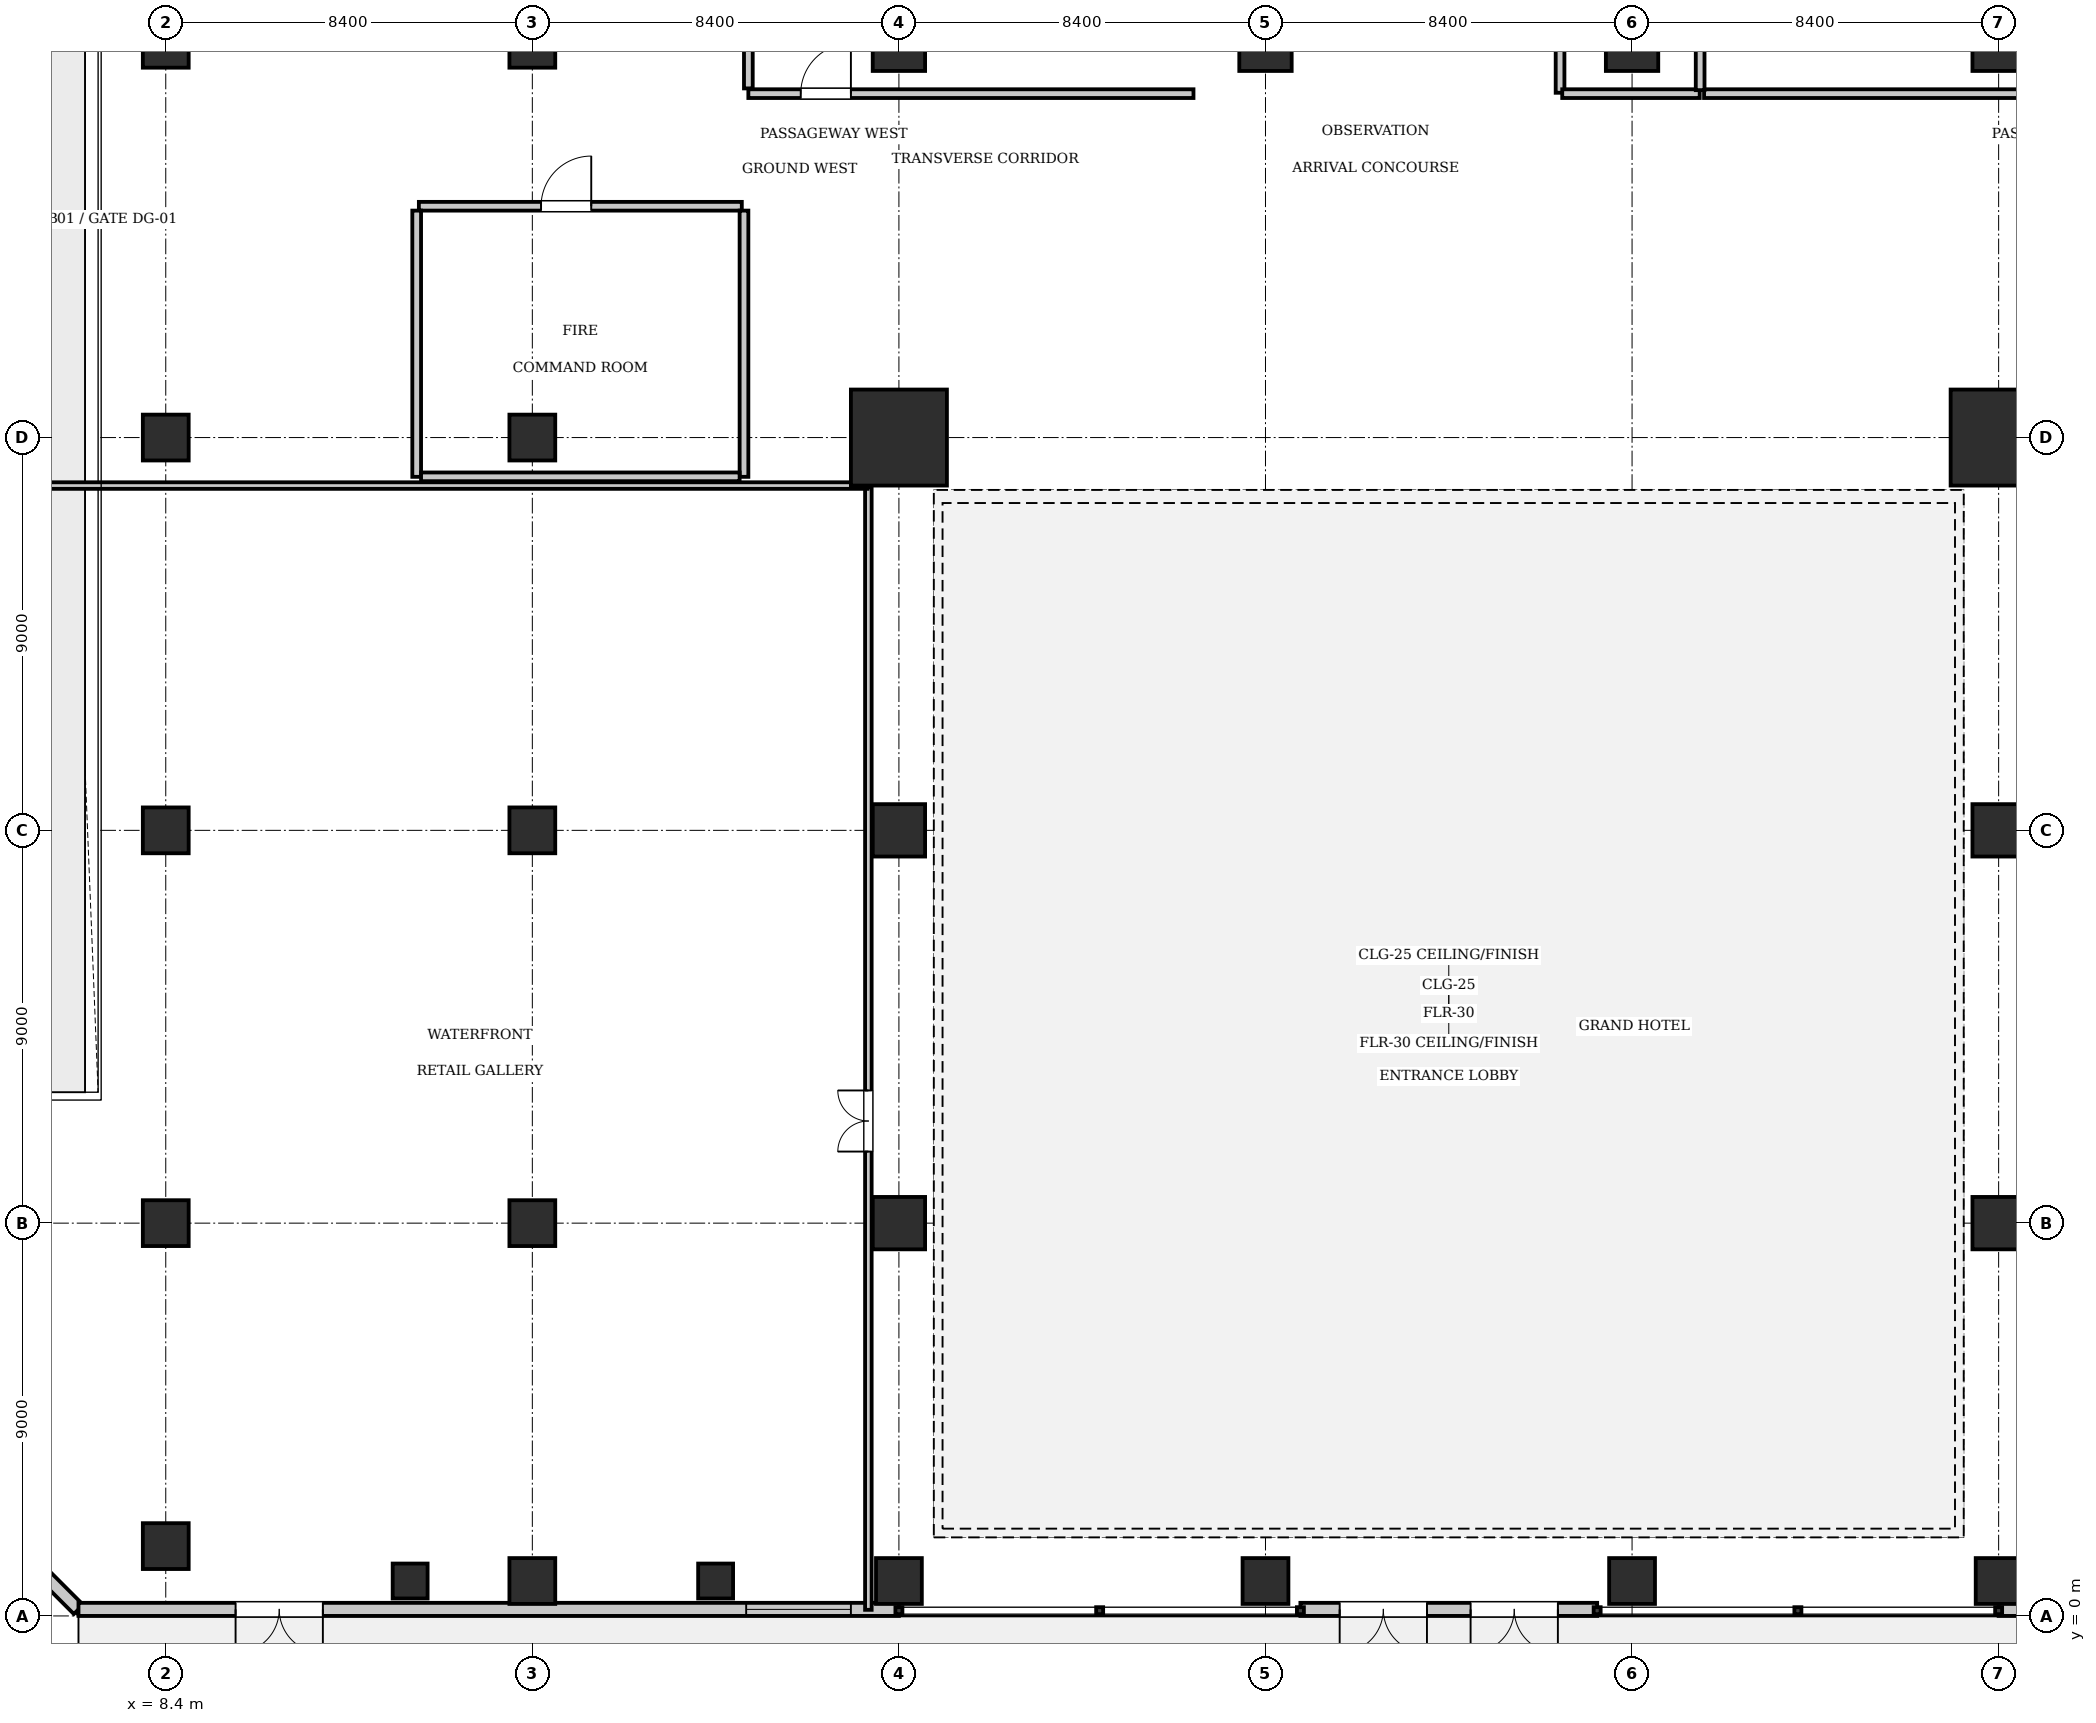
"""IFC4 building model, lengths in metres.
Left out: names, types, materials, properties, quantities, classifications, styles, units other than length and angle.
Written with IfcOpenShell. Run it as: python <this file> out.ifc"""

import sys

from ifc_helpers import new_model, si_unit, direction, frame, frame_2d, origin, origin_2d, place, context, subcontext, project, spatial, rectangle, extrude, element, fill, save


model = new_model("IFC4")
c1 = context("Model", 3, precision=1e-05, world=origin(), true_north=direction((0.0, 1.0)))
c2 = subcontext(c1, "Body", "Model", "MODEL_VIEW")
j1 = project(units=[si_unit("LENGTHUNIT", "METRE"), si_unit("PLANEANGLEUNIT", "RADIAN")], contexts=[c1])
p1 = place(None, origin())
s1 = spatial("IfcSite", under=j1, at=p1, CompositionType="ELEMENT")
p2 = place(p1, origin())
s2 = spatial("IfcBuilding", under=s1, at=p2, CompositionType="ELEMENT")
p3 = place(p2, origin())
s3 = spatial("IfcBuildingStorey", under=s2, at=p3, CompositionType="ELEMENT", Elevation=0.0)
for number, where, z_axis, x_axis in (
    (1, (25.2, 27.0, 0.0), (0.0, 0.0, 1.0), (1.0, 0.0, 0.0)),
    (2, (50.4, 27.0, 0.0), (0.0, 0.0, 1.0), (1.0, 0.0, 0.0)),
):
    element("IfcColumn", number, at=place(p3, frame(where, z_axis=z_axis, x_axis=x_axis)), inside=s3, PredefinedType="COLUMN", context=c2, shape_type="SweptSolid", body=[
        extrude(rectangle(XDim=2.2, YDim=2.2, at=origin_2d()), origin(), (0.0, 0.0, 1.0), 5.6),
    ])
for number, where, z_axis, x_axis in (
    (3, (25.2, 36.0, 0.0), (0.0, 0.0, 1.0), (1.0, 0.0, 0.0)),
    (4, (33.6, 36.0, 0.0), (0.0, 0.0, 1.0), (1.0, 0.0, 0.0)),
    (5, (42.0, 36.0, 0.0), (0.0, 0.0, 1.0), (1.0, 0.0, 0.0)),
    (6, (50.4, 36.0, 0.0), (0.0, 0.0, 1.0), (1.0, 0.0, 0.0)),
    (7, (25.2, 18.0, 0.0), (0.0, 0.0, 1.0), (1.0, 0.0, 0.0)),
    (8, (50.4, 18.0, 0.0), (0.0, 0.0, 1.0), (1.0, 0.0, 0.0)),
    (9, (25.2, 9.0, 0.0), (0.0, 0.0, 1.0), (1.0, 0.0, 0.0)),
    (10, (50.4, 9.0, 0.0), (0.0, 0.0, 1.0), (1.0, 0.0, 0.0)),
):
    element("IfcColumn", number, at=place(p3, frame(where, z_axis=z_axis, x_axis=x_axis)), inside=s3, PredefinedType="COLUMN", context=c2, shape_type="SweptSolid", body=[
        extrude(rectangle(XDim=1.2, YDim=1.2, at=origin_2d()), origin(), (0.0, 0.0, 1.0), 5.6),
    ])
for number, where, z_axis, x_axis in (
    (11, (16.8, 9.0, 0.0), (0.0, 0.0, 1.0), (1.0, 0.0, 0.0)),
    (12, (16.8, 18.0, 0.0), (0.0, 0.0, 1.0), (1.0, 0.0, 0.0)),
    (13, (16.8, 27.0, 0.0), (0.0, 0.0, 1.0), (1.0, 0.0, 0.0)),
    (14, (16.8, 36.0, 0.0), (0.0, 0.0, 1.0), (1.0, 0.0, 0.0)),
    (15, (8.4, 1.6, 0.0), (0.0, 0.0, 1.0), (1.0, 0.0, 0.0)),
    (16, (8.4, 9.0, 0.0), (0.0, 0.0, 1.0), (1.0, 0.0, 0.0)),
    (17, (8.4, 18.0, 0.0), (0.0, 0.0, 1.0), (1.0, 0.0, 0.0)),
    (18, (8.4, 27.0, 0.0), (0.0, 0.0, 1.0), (1.0, 0.0, 0.0)),
    (19, (8.4, 36.0, 0.0), (0.0, 0.0, 1.0), (1.0, 0.0, 0.0)),
    (20, (16.8, 0.8, 0.0), (0.0, 0.0, 1.0), (1.0, 0.0, 0.0)),
    (21, (25.2, 0.8, 0.0), (0.0, 0.0, 1.0), (1.0, 0.0, 0.0)),
    (22, (33.6, 0.8, 0.0), (0.0, 0.0, 1.0), (1.0, 0.0, 0.0)),
    (23, (42.0, 0.8, 0.0), (0.0, 0.0, 1.0), (1.0, 0.0, 0.0)),
    (24, (50.4, 0.8, 0.0), (0.0, 0.0, 1.0), (1.0, 0.0, 0.0)),
):
    element("IfcColumn", number, at=place(p3, frame(where, z_axis=z_axis, x_axis=x_axis)), inside=s3, PredefinedType="COLUMN", context=c2, shape_type="SweptSolid", body=[
        extrude(rectangle(XDim=1.05, YDim=1.05, at=origin_2d()), origin(), (0.0, 0.0, 1.0), 5.6),
    ])
for number, where, z_axis, x_axis in (
    (25, (14.0, 0.8, 0.0), (0.0, 0.0, 1.0), (1.0, 0.0, 0.0)),
    (26, (21.0, 0.8, 0.0), (0.0, 0.0, 1.0), (1.0, 0.0, 0.0)),
):
    element("IfcColumn", number, at=place(p3, frame(where, z_axis=z_axis, x_axis=x_axis)), inside=s3, PredefinedType="PILASTER", context=c2, shape_type="SweptSolid", body=[
        extrude(rectangle(XDim=0.8, YDim=0.8, at=origin_2d()), origin(), (0.0, 0.0, 1.0), 5.6),
    ])
p4 = place(p3, frame((0.15, 6.4, 0.0), z_axis=(0.0, 0.0, 1.0), x_axis=(0.707106781187, -0.707106781187, 0.0)))
e27 = element("IfcWall", 27, at=p4, inside=s3, PredefinedType="SOLIDWALL", context=c2, shape_type="SweptSolid", body=[
    extrude(rectangle(XDim=8.839, YDim=0.3, at=frame_2d((4.419, 0.0))), origin(), (0.0, 0.0, 1.0), 5.32),
])
p5 = place(p4, frame((3.2, 0.0, 0.9)))
e28 = element("IfcOpeningElement", 28, at=p5, cuts=e27, PredefinedType="OPENING", context=c2, shape_type="SweptSolid", body=[
    extrude(rectangle(XDim=2.4, YDim=2.6, at=frame_2d((1.2, 1.3))), frame((0.0, 0.16, 0.0), z_axis=(0.0, -1.0, 0.0), x_axis=(1.0, 0.0, 0.0)), (0.0, 0.0, 1.0), 0.32),
])
p6 = place(p3, frame((25.2, 0.15, 0.0), z_axis=(0.0, 0.0, 1.0), x_axis=(-1.0, 0.0, 0.0)))
e29 = element("IfcWall", 29, at=p6, inside=s3, PredefinedType="SOLIDWALL", context=c2, shape_type="SweptSolid", body=[
    extrude(rectangle(XDim=18.8, YDim=0.3, at=frame_2d((9.4, 0.0))), origin(), (0.0, 0.0, 1.0), 5.32),
])
p7 = place(p6, frame((13.2, 0.0, 0.0)))
e30 = element("IfcOpeningElement", 30, at=p7, cuts=e29, PredefinedType="OPENING", context=c2, shape_type="SweptSolid", body=[
    extrude(rectangle(XDim=2.0, YDim=2.4, at=frame_2d((1.0, 1.2))), frame((0.0, 0.16, 0.0), z_axis=(0.0, -1.0, 0.0), x_axis=(1.0, 0.0, 0.0)), (0.0, 0.0, 1.0), 0.32),
])
p8 = place(p6, frame((1.1, 0.0, 0.9)))
e31 = element("IfcOpeningElement", 31, at=p8, cuts=e29, PredefinedType="OPENING", context=c2, shape_type="SweptSolid", body=[
    extrude(rectangle(XDim=2.4, YDim=2.6, at=frame_2d((1.2, 1.3))), frame((0.0, 0.16, 0.0), z_axis=(0.0, -1.0, 0.0), x_axis=(1.0, 0.0, 0.0)), (0.0, 0.0, 1.0), 0.32),
])
p9 = place(p3, frame((69.2, 0.15, 0.0), z_axis=(0.0, 0.0, 1.0), x_axis=(-1.0, 0.0, 0.0)))
e32 = element("IfcWall", 32, at=p9, inside=s3, PredefinedType="SOLIDWALL", context=c2, shape_type="SweptSolid", body=[
    extrude(rectangle(XDim=18.8, YDim=0.3, at=frame_2d((9.4, 0.0))), origin(), (0.0, 0.0, 1.0), 5.32),
])
p10 = place(p9, frame((3.6, 0.0, 0.0)))
e33 = element("IfcOpeningElement", 33, at=p10, cuts=e32, PredefinedType="OPENING", context=c2, shape_type="SweptSolid", body=[
    extrude(rectangle(XDim=2.0, YDim=2.4, at=frame_2d((1.0, 1.2))), frame((0.0, 0.16, 0.0), z_axis=(0.0, -1.0, 0.0), x_axis=(1.0, 0.0, 0.0)), (0.0, 0.0, 1.0), 0.32),
])
p11 = place(p9, frame((15.1, 0.0, 0.9)))
e34 = element("IfcOpeningElement", 34, at=p11, cuts=e32, PredefinedType="OPENING", context=c2, shape_type="SweptSolid", body=[
    extrude(rectangle(XDim=2.4, YDim=2.6, at=frame_2d((1.2, 1.3))), frame((0.0, 0.16, 0.0), z_axis=(0.0, -1.0, 0.0), x_axis=(1.0, 0.0, 0.0)), (0.0, 0.0, 1.0), 0.32),
])
p12 = place(p3, frame((41.2, 0.15, 0.0), z_axis=(0.0, 0.0, 1.0), x_axis=(-1.0, 0.0, 0.0)))
e35 = element("IfcWall", 35, at=p12, inside=s3, PredefinedType="SOLIDWALL", context=c2, shape_type="SweptSolid", body=[
    extrude(rectangle(XDim=6.8, YDim=0.3, at=frame_2d((3.4, 0.0))), origin(), (0.0, 0.0, 1.0), 5.32),
])
p13 = place(p12, frame((0.9, 0.0, 0.0)))
e36 = element("IfcOpeningElement", 36, at=p13, cuts=e35, PredefinedType="OPENING", context=c2, shape_type="SweptSolid", body=[
    extrude(rectangle(XDim=2.0, YDim=2.4, at=frame_2d((1.0, 1.2))), frame((0.0, 0.16, 0.0), z_axis=(0.0, -1.0, 0.0), x_axis=(1.0, 0.0, 0.0)), (0.0, 0.0, 1.0), 0.32),
])
p14 = place(p12, frame((3.9, 0.0, 0.0)))
e37 = element("IfcOpeningElement", 37, at=p14, cuts=e35, PredefinedType="OPENING", context=c2, shape_type="SweptSolid", body=[
    extrude(rectangle(XDim=2.0, YDim=2.4, at=frame_2d((1.0, 1.2))), frame((0.0, 0.16, 0.0), z_axis=(0.0, -1.0, 0.0), x_axis=(1.0, 0.0, 0.0)), (0.0, 0.0, 1.0), 0.32),
])
p15 = place(p3, frame((21.75, 34.88, 0.0), z_axis=(0.0, 0.0, 1.0), x_axis=(1.0, 0.0, 0.0)))
e38 = element("IfcWall", 38, at=p15, inside=s3, PredefinedType="PARTITIONING", context=c2, shape_type="SweptSolid", body=[
    extrude(rectangle(XDim=10.2, YDim=0.2, at=frame_2d((5.1, 0.0))), origin(), (0.0, 0.0, 1.0), 5.32),
])
p16 = place(p15, frame((1.2, 0.0, 0.0)))
e39 = element("IfcOpeningElement", 39, at=p16, cuts=e38, PredefinedType="OPENING", context=c2, shape_type="SweptSolid", body=[
    extrude(rectangle(XDim=1.15, YDim=2.15, at=frame_2d((0.575, 1.075))), frame((0.0, 0.11, 0.0), z_axis=(0.0, -1.0, 0.0), x_axis=(1.0, 0.0, 0.0)), (0.0, 0.0, 1.0), 0.22),
])
p17 = place(p3, frame((21.75, 35.0, 0.0), z_axis=(0.0, 0.0, 1.0), x_axis=(0.0, 1.0, 0.0)))
e40 = element("IfcWall", 40, at=p17, inside=s3, PredefinedType="PARTITIONING", context=c2, shape_type="SweptSolid", body=[
    extrude(rectangle(XDim=18.7, YDim=0.2, at=frame_2d((9.35, 0.0))), origin(), (0.0, 0.0, 1.0), 5.32),
])
p18 = place(p3, frame((43.65, 34.88, 0.0), z_axis=(0.0, 0.0, 1.0), x_axis=(1.0, 0.0, 0.0)))
e41 = element("IfcWall", 41, at=p18, inside=s3, PredefinedType="PARTITIONING", context=c2, shape_type="SweptSolid", body=[
    extrude(rectangle(XDim=10.2, YDim=0.2, at=frame_2d((5.1, 0.0))), origin(), (0.0, 0.0, 1.0), 5.32),
])
p19 = place(p18, frame((7.72, 0.0, 0.0)))
e42 = element("IfcOpeningElement", 42, at=p19, cuts=e41, PredefinedType="OPENING", context=c2, shape_type="SweptSolid", body=[
    extrude(rectangle(XDim=1.15, YDim=2.15, at=frame_2d((0.575, 1.075))), frame((0.0, 0.11, 0.0), z_axis=(0.0, -1.0, 0.0), x_axis=(1.0, 0.0, 0.0)), (0.0, 0.0, 1.0), 0.22),
])
p20 = place(p3, frame((14.2, 32.3, 0.0), z_axis=(0.0, 0.0, 1.0), x_axis=(1.0, 0.0, 0.0)))
e43 = element("IfcWall", 43, at=p20, inside=s3, PredefinedType="PARTITIONING", context=c2, shape_type="SweptSolid", body=[
    extrude(rectangle(XDim=7.4, YDim=0.2, at=frame_2d((3.7, 0.0))), origin(), (0.0, 0.0, 1.0), 5.32),
])
p21 = place(p20, frame((2.8, 0.0, 0.0)))
e44 = element("IfcOpeningElement", 44, at=p21, cuts=e43, PredefinedType="OPENING", context=c2, shape_type="SweptSolid", body=[
    extrude(rectangle(XDim=1.15, YDim=2.15, at=frame_2d((0.575, 1.075))), frame((0.0, 0.11, 0.0), z_axis=(0.0, -1.0, 0.0), x_axis=(1.0, 0.0, 0.0)), (0.0, 0.0, 1.0), 0.22),
])
for number, where, z_axis, x_axis in (
    (45, (14.15, 26.1, 0.0), (0.0, 0.0, 1.0), (0.0, 1.0, 0.0)),
    (46, (21.65, 26.1, 0.0), (0.0, 0.0, 1.0), (0.0, 1.0, 0.0)),
):
    element("IfcWall", number, at=place(p3, frame(where, z_axis=z_axis, x_axis=x_axis)), inside=s3, PredefinedType="PARTITIONING", context=c2, shape_type="SweptSolid", body=[
        extrude(rectangle(XDim=6.1, YDim=0.2, at=frame_2d((3.05, 0.0))), origin(), (0.0, 0.0, 1.0), 5.32),
    ])
p22 = place(p3, frame((14.25, 26.1, 0.0), z_axis=(0.0, 0.0, 1.0), x_axis=(1.0, 0.0, 0.0)))
e47 = element("IfcWall", 47, at=p22, inside=s3, PredefinedType="PARTITIONING", context=c2, shape_type="SweptSolid", body=[
    extrude(rectangle(XDim=7.3, YDim=0.2, at=frame_2d((3.65, 0.0))), origin(), (0.0, 0.0, 1.0), 5.32),
])
p23 = place(p3, frame((40.35, 34.9, 0.0), z_axis=(0.0, 0.0, 1.0), x_axis=(0.0, 1.0, 0.0)))
e48 = element("IfcWall", 48, at=p23, inside=s3, PredefinedType="PARTITIONING", context=c2, shape_type="SweptSolid", body=[
    extrude(rectangle(XDim=6.45, YDim=0.2, at=frame_2d((3.225, 0.0))), origin(), (0.0, 0.0, 1.0), 5.32),
])
p24 = place(p23, frame((2.4, 0.0, 0.0)))
e49 = element("IfcOpeningElement", 49, at=p24, cuts=e48, PredefinedType="OPENING", context=c2, shape_type="SweptSolid", body=[
    extrude(rectangle(XDim=1.15, YDim=2.15, at=frame_2d((0.575, 1.075))), frame((0.0, 0.11, 0.0), z_axis=(0.0, -1.0, 0.0), x_axis=(1.0, 0.0, 0.0)), (0.0, 0.0, 1.0), 0.22),
])
p25 = place(p3, frame((40.4, 34.88, 0.0), z_axis=(0.0, 0.0, 1.0), x_axis=(1.0, 0.0, 0.0)))
e50 = element("IfcWall", 50, at=p25, inside=s3, PredefinedType="PARTITIONING", context=c2, shape_type="SweptSolid", body=[
    extrude(rectangle(XDim=3.15, YDim=0.2, at=frame_2d((1.575, 0.0))), origin(), (0.0, 0.0, 1.0), 5.32),
])
p26 = place(p3, frame((43.56, 34.96, 0.0), z_axis=(0.0, 0.0, 1.0), x_axis=(0.0, 1.0, 0.0)))
e51 = element("IfcWall", 51, at=p26, inside=s3, PredefinedType="PARTITIONING", context=c2, shape_type="SweptSolid", body=[
    extrude(rectangle(XDim=3.16, YDim=0.2, at=frame_2d((1.58, 0.0))), origin(), (0.0, 0.0, 1.0), 5.32),
])
p27 = place(p26, frame((1.67, 0.0, 0.0)))
e52 = element("IfcOpeningElement", 52, at=p27, cuts=e51, PredefinedType="OPENING", context=c2, shape_type="SweptSolid", body=[
    extrude(rectangle(XDim=1.15, YDim=2.15, at=frame_2d((0.575, 1.075))), frame((0.0, 0.11, 0.0), z_axis=(0.0, -1.0, 0.0), x_axis=(1.0, 0.0, 0.0)), (0.0, 0.0, 1.0), 0.22),
])
p28 = place(p3, frame((24.5, 0.14, 0.0), z_axis=(0.0, 0.0, 1.0), x_axis=(0.0, 1.0, 0.0)))
e53 = element("IfcWall", 53, at=p28, inside=s3, PredefinedType="PARTITIONING", context=c2, shape_type="SweptSolid", body=[
    extrude(rectangle(XDim=25.72, YDim=0.15, at=frame_2d((12.86, 0.0))), origin(), (0.0, 0.0, 1.0), 5.32),
])
p29 = place(p28, frame((10.5, 0.0, 0.0)))
e54 = element("IfcOpeningElement", 54, at=p29, cuts=e53, PredefinedType="OPENING", context=c2, shape_type="SweptSolid", body=[
    extrude(rectangle(XDim=1.4, YDim=2.2, at=frame_2d((0.7, 1.1))), frame((0.0, 0.085, 0.0), z_axis=(0.0, -1.0, 0.0), x_axis=(1.0, 0.0, 0.0)), (0.0, 0.0, 1.0), 0.17),
])
p30 = place(p3, frame((0.14, 25.9, 0.0), z_axis=(0.0, 0.0, 1.0), x_axis=(1.0, 0.0, 0.0)))
e55 = element("IfcWall", 55, at=p30, inside=s3, PredefinedType="PARTITIONING", context=c2, shape_type="SweptSolid", body=[
    extrude(rectangle(XDim=24.34, YDim=0.15, at=frame_2d((12.17, 0.0))), origin(), (0.0, 0.0, 1.0), 5.32),
])
p31 = place(p7, origin())
e56 = element("IfcDoor", 56, at=p31, inside=s3, OperationType="DOUBLE_DOOR_SINGLE_SWING", PredefinedType="DOOR", context=c2, shape_type="SweptSolid", body=[
    extrude(rectangle(XDim=2.0, YDim=2.4, at=frame_2d((1.0, 1.2))), frame((0.0, 0.025, 0.0), z_axis=(0.0, -1.0, 0.0), x_axis=(1.0, 0.0, 0.0)), (0.0, 0.0, 1.0), 0.05),
])
fill(e30, e56)
p32 = place(p8, origin())
e57 = element("IfcWindow", 57, at=p32, inside=s3, PartitioningType="SINGLE_PANEL", PredefinedType="WINDOW", context=c2, shape_type="SweptSolid", body=[
    extrude(rectangle(XDim=2.4, YDim=2.6, at=frame_2d((1.2, 1.3))), frame((0.0, 0.03, 0.0), z_axis=(0.0, -1.0, 0.0), x_axis=(1.0, 0.0, 0.0)), (0.0, 0.0, 1.0), 0.06),
])
fill(e31, e57)
p33 = place(p13, origin())
e58 = element("IfcDoor", 58, at=p33, inside=s3, OperationType="DOUBLE_DOOR_SINGLE_SWING", PredefinedType="DOOR", context=c2, shape_type="SweptSolid", body=[
    extrude(rectangle(XDim=2.0, YDim=2.4, at=frame_2d((1.0, 1.2))), frame((0.0, 0.025, 0.0), z_axis=(0.0, -1.0, 0.0), x_axis=(1.0, 0.0, 0.0)), (0.0, 0.0, 1.0), 0.05),
])
fill(e36, e58)
p34 = place(p14, origin())
e59 = element("IfcDoor", 59, at=p34, inside=s3, OperationType="DOUBLE_DOOR_SINGLE_SWING", PredefinedType="DOOR", context=c2, shape_type="SweptSolid", body=[
    extrude(rectangle(XDim=2.0, YDim=2.4, at=frame_2d((1.0, 1.2))), frame((0.0, 0.025, 0.0), z_axis=(0.0, -1.0, 0.0), x_axis=(1.0, 0.0, 0.0)), (0.0, 0.0, 1.0), 0.05),
])
fill(e37, e59)
p35 = place(p16, origin())
e60 = element("IfcDoor", 60, at=p35, inside=s3, OperationType="SINGLE_SWING_RIGHT", PredefinedType="DOOR", context=c2, shape_type="SweptSolid", body=[
    extrude(rectangle(XDim=1.15, YDim=2.15, at=frame_2d((0.575, 1.075))), frame((0.0, 0.025, 0.0), z_axis=(0.0, -1.0, 0.0), x_axis=(1.0, 0.0, 0.0)), (0.0, 0.0, 1.0), 0.05),
])
fill(e39, e60)
p36 = place(p21, origin())
e61 = element("IfcDoor", 61, at=p36, inside=s3, OperationType="SINGLE_SWING_RIGHT", PredefinedType="DOOR", context=c2, shape_type="SweptSolid", body=[
    extrude(rectangle(XDim=1.15, YDim=2.15, at=frame_2d((0.575, 1.075))), frame((0.0, 0.025, 0.0), z_axis=(0.0, -1.0, 0.0), x_axis=(1.0, 0.0, 0.0)), (0.0, 0.0, 1.0), 0.05),
])
fill(e44, e61)
p37 = place(p29, origin())
e62 = element("IfcDoor", 62, at=p37, inside=s3, OperationType="DOUBLE_DOOR_SINGLE_SWING", PredefinedType="DOOR", context=c2, shape_type="SweptSolid", body=[
    extrude(rectangle(XDim=1.4, YDim=2.2, at=frame_2d((0.7, 1.1))), frame((0.0, 0.025, 0.0), z_axis=(0.0, -1.0, 0.0), x_axis=(1.0, 0.0, 0.0)), (0.0, 0.0, 1.0), 0.05),
])
fill(e54, e62)
save(model, sys.argv[1])
